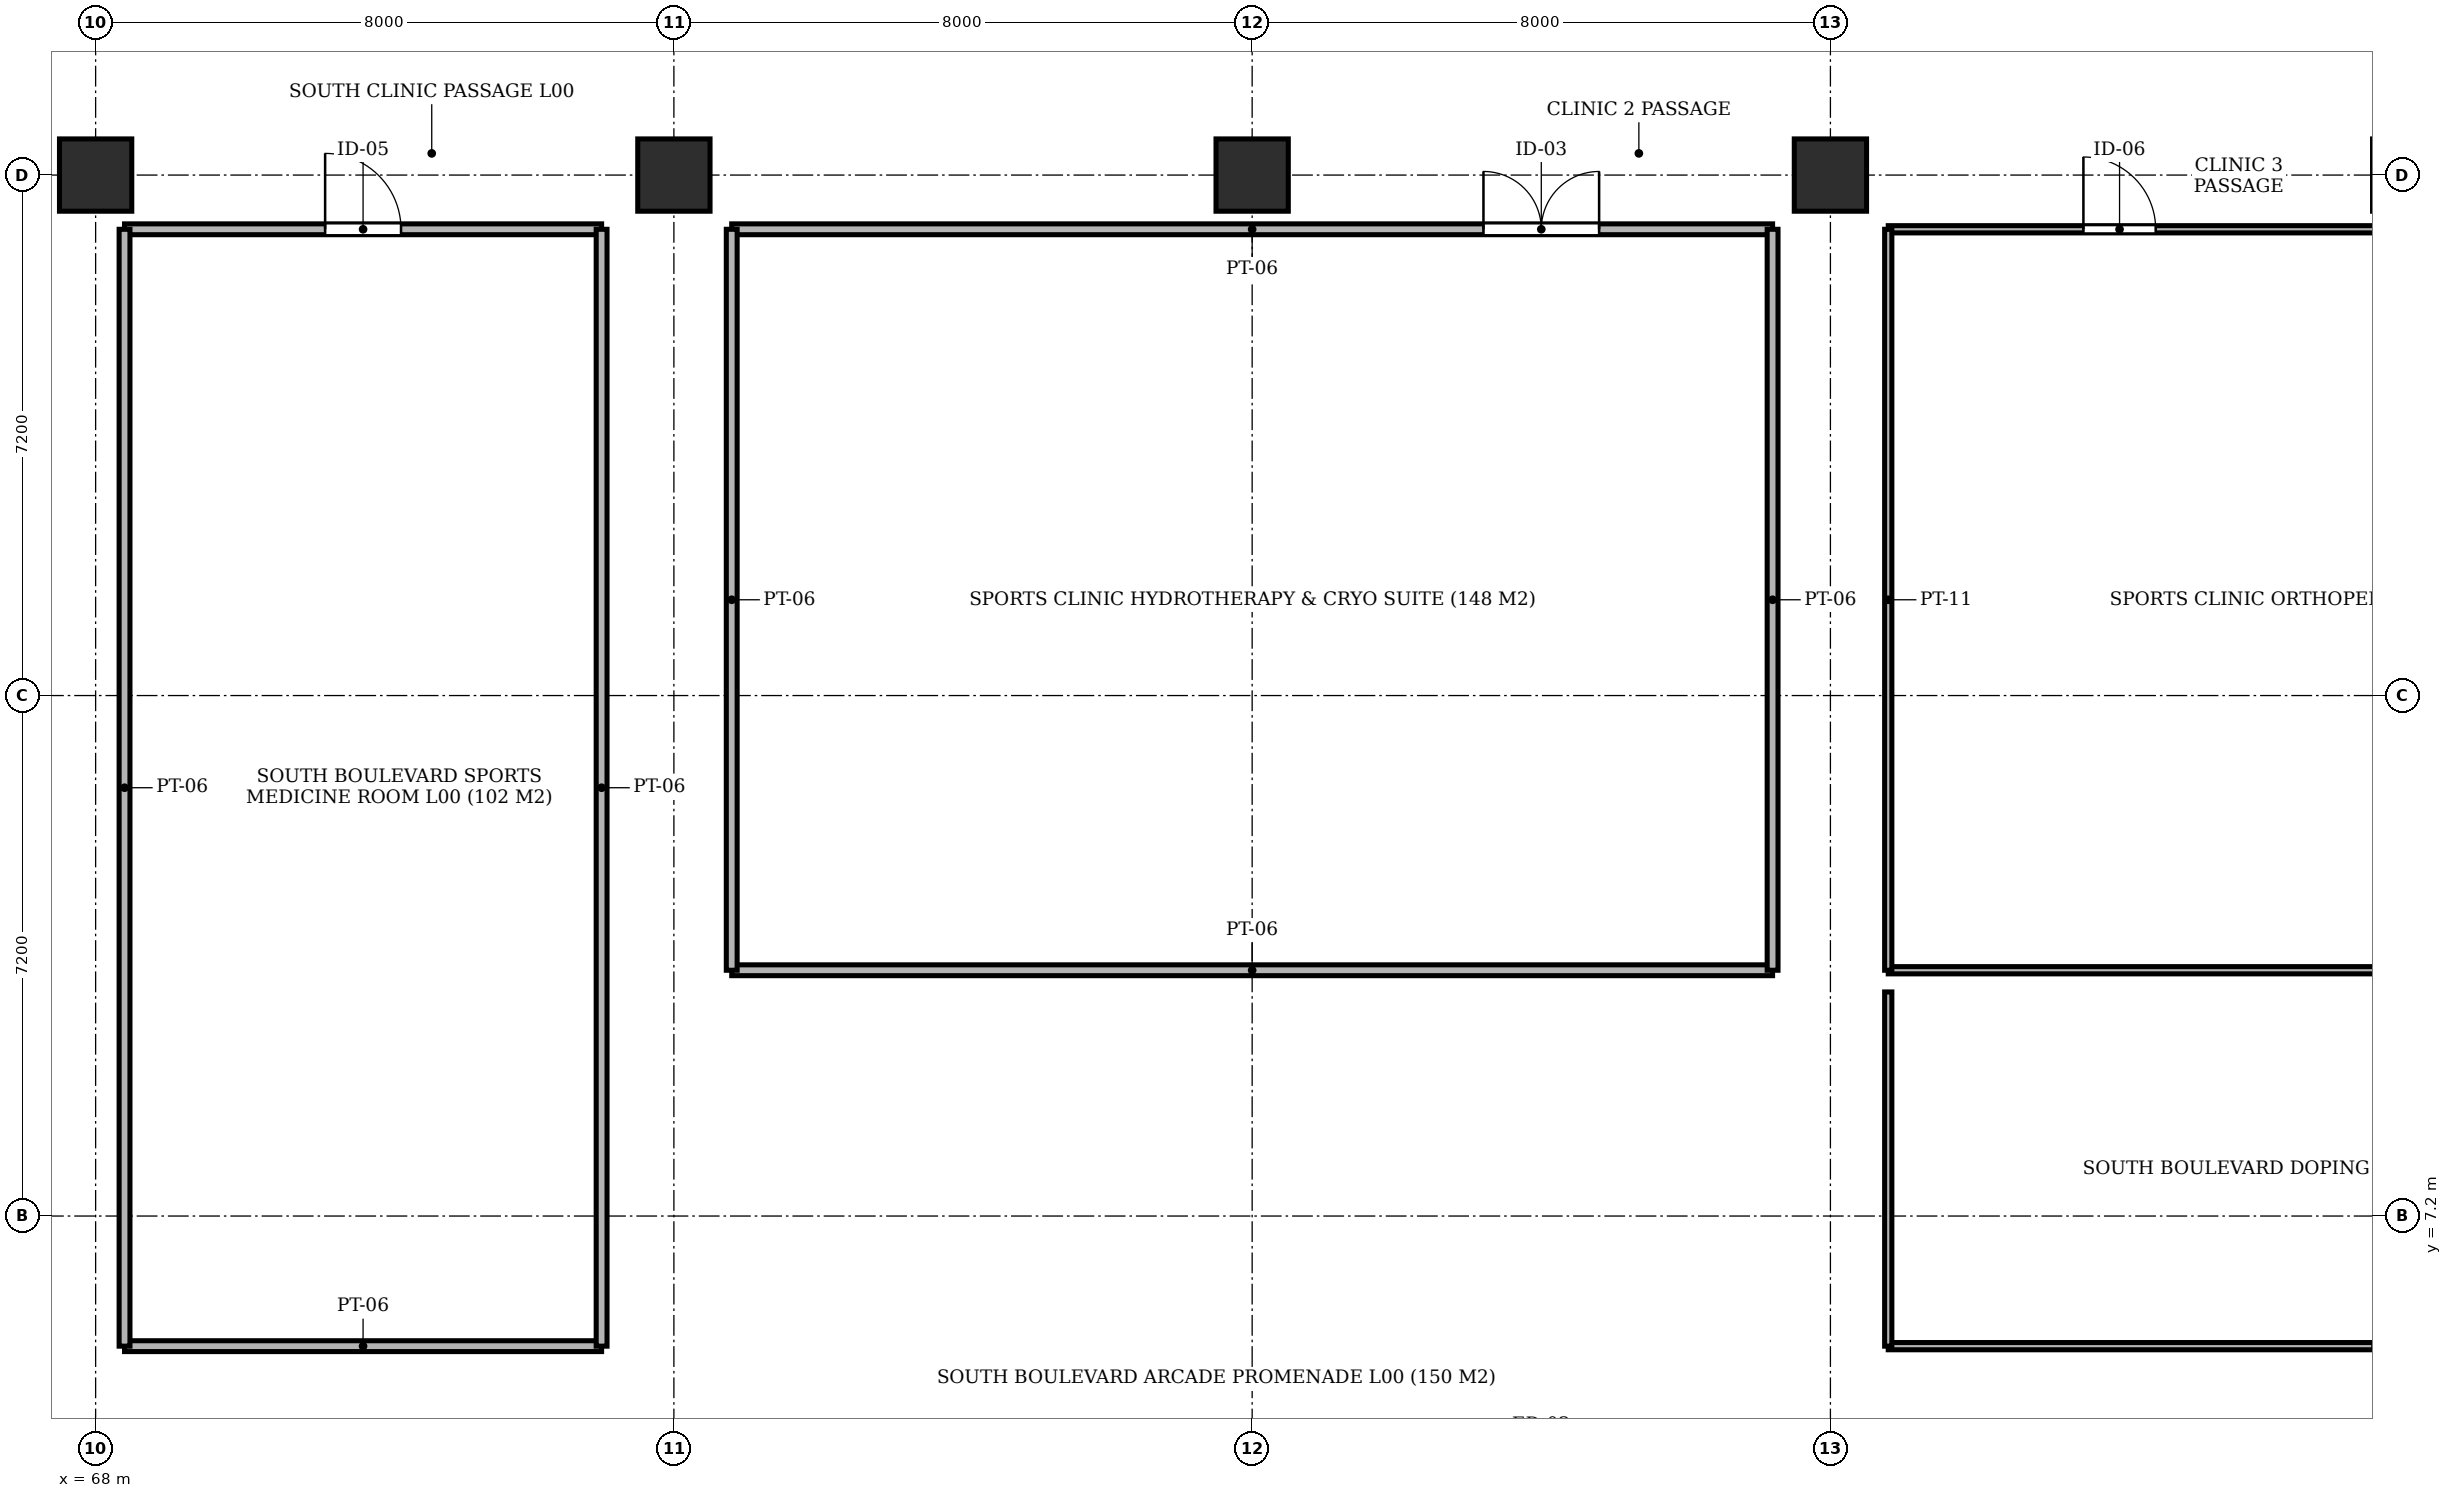
"""IFC4 building model, lengths in metres.
Left out: names, types, materials, properties, quantities, classifications, styles, units other than length and angle.
Written with IfcOpenShell. Run it as: python <this file> out.ifc"""

import sys

from ifc_helpers import new_model, si_unit, direction, frame, frame_2d, origin, origin_2d, place, context, subcontext, project, spatial, rectangle, extrude, element, fill, save


model = new_model("IFC4")
c1 = context("Model", 3, precision=1e-05, world=origin(), true_north=direction((0.0, 1.0)))
c2 = subcontext(c1, "Body", "Model", "MODEL_VIEW")
j1 = project(units=[si_unit("LENGTHUNIT", "METRE"), si_unit("PLANEANGLEUNIT", "RADIAN")], contexts=[c1])
p1 = place(None, origin())
s1 = spatial("IfcSite", under=j1, at=p1, CompositionType="ELEMENT")
p2 = place(p1, origin())
s2 = spatial("IfcBuilding", under=s1, at=p2, CompositionType="ELEMENT")
p3 = place(p2, origin())
s3 = spatial("IfcBuildingStorey", under=s2, at=p3, CompositionType="ELEMENT", Elevation=0.0)
for number, where, z_axis, x_axis in (
    (1, (68.0, 21.6, -0.35), (0.0, 0.0, 1.0), (1.0, 0.0, 0.0)),
    (2, (76.0, 21.6, -0.35), (0.0, 0.0, 1.0), (1.0, 0.0, 0.0)),
    (3, (84.0, 21.6, -0.35), (0.0, 0.0, 1.0), (1.0, 0.0, 0.0)),
    (4, (92.0, 21.6, -0.35), (0.0, 0.0, 1.0), (1.0, 0.0, 0.0)),
):
    element("IfcColumn", number, at=place(p3, frame(where, z_axis=z_axis, x_axis=x_axis)), inside=s3, PredefinedType="COLUMN", context=c2, shape_type="SweptSolid", body=[
        extrude(rectangle(XDim=1.0, YDim=1.0, at=origin_2d()), origin(), (0.0, 0.0, 1.0), 4.65),
    ])
p4 = place(p3, frame((76.8, 10.6, 0.0), z_axis=(0.0, 0.0, 1.0), x_axis=(1.0, 0.0, 0.0)))
e5 = element("IfcWall", 5, at=p4, inside=s3, PredefinedType="PARTITIONING", context=c2, shape_type="SweptSolid", body=[
    extrude(rectangle(XDim=14.4, YDim=0.15, at=frame_2d((7.2, 0.0))), origin(), (0.0, 0.0, 1.0), 3.88),
])
p5 = place(p3, frame((76.8, 20.85, 0.0), z_axis=(0.0, 0.0, 1.0), x_axis=(1.0, 0.0, 0.0)))
e6 = element("IfcWall", 6, at=p5, inside=s3, PredefinedType="PARTITIONING", context=c2, shape_type="SweptSolid", body=[
    extrude(rectangle(XDim=14.4, YDim=0.15, at=frame_2d((7.2, 0.0))), origin(), (0.0, 0.0, 1.0), 3.88),
])
p6 = place(p5, frame((10.4, 0.0, 0.0)))
e7 = element("IfcOpeningElement", 7, at=p6, cuts=e6, PredefinedType="OPENING", context=c2, shape_type="SweptSolid", body=[
    extrude(rectangle(XDim=1.6, YDim=2.2, at=frame_2d((0.8, 1.1))), frame((0.0, 0.087, 0.0), z_axis=(0.0, -1.0, 0.0), x_axis=(1.0, 0.0, 0.0)), (0.0, 0.0, 1.0), 0.174),
])
for number, where, z_axis, x_axis in (
    (8, (76.8, 10.6, 0.0), (0.0, 0.0, 1.0), (0.0, 1.0, 0.0)),
    (9, (91.2, 10.6, 0.0), (0.0, 0.0, 1.0), (0.0, 1.0, 0.0)),
):
    element("IfcWall", number, at=place(p3, frame(where, z_axis=z_axis, x_axis=x_axis)), inside=s3, PredefinedType="PARTITIONING", context=c2, shape_type="SweptSolid", body=[
        extrude(rectangle(XDim=10.25, YDim=0.15, at=frame_2d((5.125, 0.0))), origin(), (0.0, 0.0, 1.0), 3.88),
    ])
p7 = place(p3, frame((92.8, 10.6, 0.0), z_axis=(0.0, 0.0, 1.0), x_axis=(1.0, 0.0, 0.0)))
e10 = element("IfcWall", 10, at=p7, inside=s3, PredefinedType="PARTITIONING", context=c2, shape_type="SweptSolid", body=[
    extrude(rectangle(XDim=14.4, YDim=0.1, at=frame_2d((7.2, 0.0))), origin(), (0.0, 0.0, 1.0), 3.88),
])
p8 = place(p3, frame((92.8, 20.85, 0.0), z_axis=(0.0, 0.0, 1.0), x_axis=(1.0, 0.0, 0.0)))
e11 = element("IfcWall", 11, at=p8, inside=s3, PredefinedType="PARTITIONING", context=c2, shape_type="SweptSolid", body=[
    extrude(rectangle(XDim=14.4, YDim=0.1, at=frame_2d((7.2, 0.0))), origin(), (0.0, 0.0, 1.0), 3.88),
])
p9 = place(p8, frame((2.7, 0.0, 0.0)))
e12 = element("IfcOpeningElement", 12, at=p9, cuts=e11, PredefinedType="OPENING", context=c2, shape_type="SweptSolid", body=[
    extrude(rectangle(XDim=1.0, YDim=2.15, at=frame_2d((0.5, 1.075))), frame((0.0, 0.062, 0.0), z_axis=(0.0, -1.0, 0.0), x_axis=(1.0, 0.0, 0.0)), (0.0, 0.0, 1.0), 0.124),
])
p10 = place(p3, frame((92.8, 10.6, 0.0), z_axis=(0.0, 0.0, 1.0), x_axis=(0.0, 1.0, 0.0)))
e13 = element("IfcWall", 13, at=p10, inside=s3, PredefinedType="PARTITIONING", context=c2, shape_type="SweptSolid", body=[
    extrude(rectangle(XDim=10.25, YDim=0.1, at=frame_2d((5.125, 0.0))), origin(), (0.0, 0.0, 1.0), 3.88),
])
p11 = place(p3, frame((68.4, 5.4, 0.0), z_axis=(0.0, 0.0, 1.0), x_axis=(1.0, 0.0, 0.0)))
e14 = element("IfcWall", 14, at=p11, inside=s3, PredefinedType="PARTITIONING", context=c2, shape_type="SweptSolid", body=[
    extrude(rectangle(XDim=6.6, YDim=0.15, at=frame_2d((3.3, 0.0))), origin(), (0.0, 0.0, 1.0), 3.88),
])
p12 = place(p3, frame((68.4, 20.85, 0.0), z_axis=(0.0, 0.0, 1.0), x_axis=(1.0, 0.0, 0.0)))
e15 = element("IfcWall", 15, at=p12, inside=s3, PredefinedType="PARTITIONING", context=c2, shape_type="SweptSolid", body=[
    extrude(rectangle(XDim=6.6, YDim=0.15, at=frame_2d((3.3, 0.0))), origin(), (0.0, 0.0, 1.0), 3.88),
])
p13 = place(p12, frame((2.775, 0.0, 0.0)))
e16 = element("IfcOpeningElement", 16, at=p13, cuts=e15, PredefinedType="OPENING", context=c2, shape_type="SweptSolid", body=[
    extrude(rectangle(XDim=1.05, YDim=2.15, at=frame_2d((0.525, 1.075))), frame((0.0, 0.087, 0.0), z_axis=(0.0, -1.0, 0.0), x_axis=(1.0, 0.0, 0.0)), (0.0, 0.0, 1.0), 0.174),
])
for number, where, z_axis, x_axis in (
    (17, (68.4, 5.4, 0.0), (0.0, 0.0, 1.0), (0.0, 1.0, 0.0)),
    (18, (75.0, 5.4, 0.0), (0.0, 0.0, 1.0), (0.0, 1.0, 0.0)),
):
    element("IfcWall", number, at=place(p3, frame(where, z_axis=z_axis, x_axis=x_axis)), inside=s3, PredefinedType="PARTITIONING", context=c2, shape_type="SweptSolid", body=[
        extrude(rectangle(XDim=15.45, YDim=0.15, at=frame_2d((7.725, 0.0))), origin(), (0.0, 0.0, 1.0), 3.88),
    ])
p14 = place(p3, frame((92.8, 5.4, 0.0), z_axis=(0.0, 0.0, 1.0), x_axis=(1.0, 0.0, 0.0)))
e19 = element("IfcWall", 19, at=p14, inside=s3, PredefinedType="PARTITIONING", context=c2, shape_type="SweptSolid", body=[
    extrude(rectangle(XDim=14.4, YDim=0.1, at=frame_2d((7.2, 0.0))), origin(), (0.0, 0.0, 1.0), 3.88),
])
p15 = place(p14, frame((6.7, 0.0, 0.0)))
e20 = element("IfcOpeningElement", 20, at=p15, cuts=e19, PredefinedType="OPENING", context=c2, shape_type="SweptSolid", body=[
    extrude(rectangle(XDim=1.0, YDim=2.15, at=frame_2d((0.5, 1.075))), frame((0.0, 0.062, 0.0), z_axis=(0.0, -1.0, 0.0), x_axis=(1.0, 0.0, 0.0)), (0.0, 0.0, 1.0), 0.124),
])
p16 = place(p3, frame((92.8, 5.4, 0.0), z_axis=(0.0, 0.0, 1.0), x_axis=(0.0, 1.0, 0.0)))
e21 = element("IfcWall", 21, at=p16, inside=s3, PredefinedType="PARTITIONING", context=c2, shape_type="SweptSolid", body=[
    extrude(rectangle(XDim=4.9, YDim=0.1, at=frame_2d((2.45, 0.0))), origin(), (0.0, 0.0, 1.0), 3.88),
])
p17 = place(p6, origin())
e22 = element("IfcDoor", 22, at=p17, inside=s3, OperationType="DOUBLE_DOOR_SINGLE_SWING", PredefinedType="DOOR", context=c2, shape_type="SweptSolid", body=[
    extrude(rectangle(XDim=1.6, YDim=2.2, at=frame_2d((0.8, 1.1))), frame((0.0, 0.025, 0.0), z_axis=(0.0, -1.0, 0.0), x_axis=(1.0, 0.0, 0.0)), (0.0, 0.0, 1.0), 0.05),
])
fill(e7, e22)
p18 = place(p9, origin())
e23 = element("IfcDoor", 23, at=p18, inside=s3, OperationType="SINGLE_SWING_LEFT", PredefinedType="DOOR", context=c2, shape_type="SweptSolid", body=[
    extrude(rectangle(XDim=1.0, YDim=2.15, at=frame_2d((0.5, 1.075))), frame((0.0, 0.025, 0.0), z_axis=(0.0, -1.0, 0.0), x_axis=(1.0, 0.0, 0.0)), (0.0, 0.0, 1.0), 0.05),
])
fill(e12, e23)
p19 = place(p13, origin())
e24 = element("IfcDoor", 24, at=p19, inside=s3, OperationType="SINGLE_SWING_LEFT", PredefinedType="DOOR", context=c2, shape_type="SweptSolid", body=[
    extrude(rectangle(XDim=1.05, YDim=2.15, at=frame_2d((0.525, 1.075))), frame((0.0, 0.025, 0.0), z_axis=(0.0, -1.0, 0.0), x_axis=(1.0, 0.0, 0.0)), (0.0, 0.0, 1.0), 0.05),
])
fill(e16, e24)
save(model, sys.argv[1])
